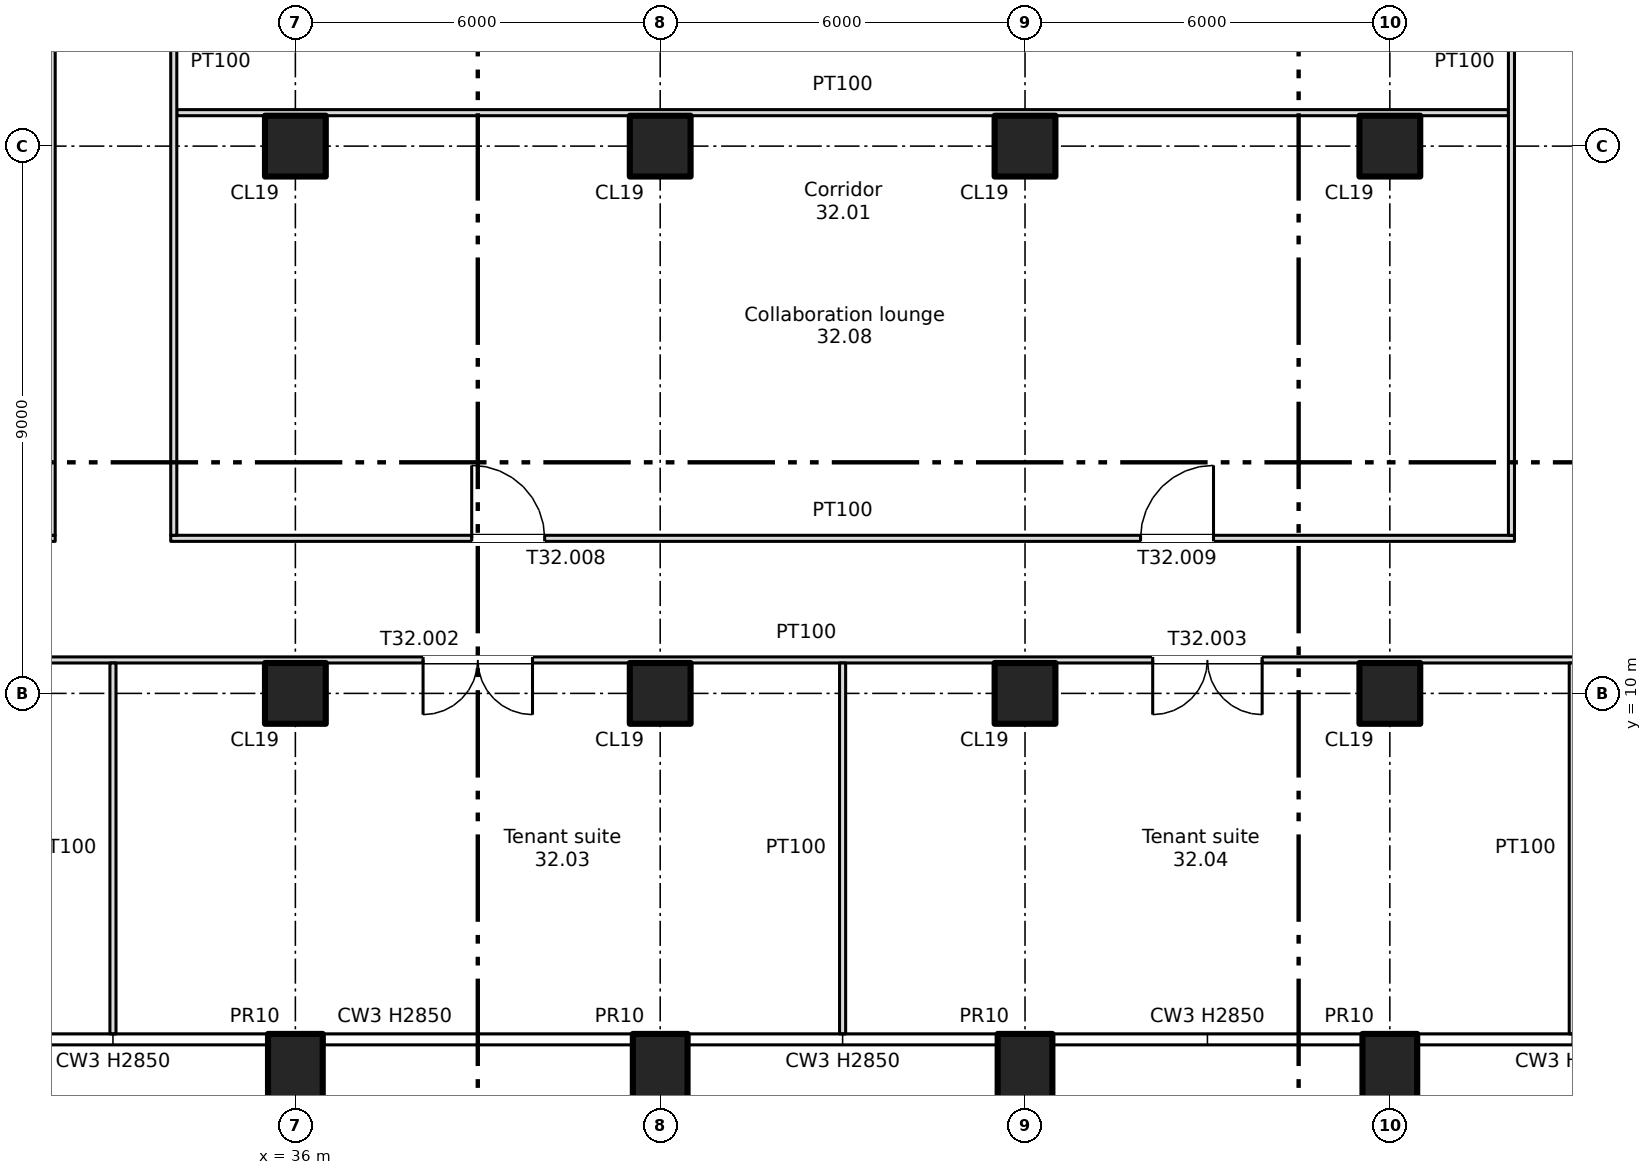
"""IFC4 building model, lengths in metres.
Left out: names, types, materials, properties, quantities, classifications, styles, units other than length and angle.
Written with IfcOpenShell. Run it as: python <this file> out.ifc"""

import sys

from ifc_helpers import new_model, si_unit, direction, frame, frame_2d, origin, origin_2d, place, context, subcontext, project, spatial, rectangle, extrude, element, fill, save


model = new_model("IFC4")
c1 = context("Model", 3, precision=1e-05, world=origin(), true_north=direction((0.0, 1.0)))
c2 = subcontext(c1, "Body", "Model", "MODEL_VIEW")
j1 = project(units=[si_unit("LENGTHUNIT", "METRE"), si_unit("PLANEANGLEUNIT", "RADIAN")], contexts=[c1])
p1 = place(None, origin())
s1 = spatial("IfcSite", under=j1, at=p1, CompositionType="ELEMENT")
p2 = place(p1, origin())
s2 = spatial("IfcBuilding", under=s1, at=p2, CompositionType="ELEMENT")
p3 = place(p2, frame((0.0, 0.0, 223.0)))
s3 = spatial("IfcBuildingStorey", under=s2, at=p3, CompositionType="ELEMENT", Elevation=223.0)
for number, where, z_axis, x_axis in (
    (1, (36.0, 3.7, -0.4), (0.0, 0.0, 1.0), (1.0, 0.0, 0.0)),
    (2, (42.0, 3.7, -0.4), (0.0, 0.0, 1.0), (1.0, 0.0, 0.0)),
    (3, (48.0, 3.7, -0.4), (0.0, 0.0, 1.0), (1.0, 0.0, 0.0)),
    (4, (54.0, 3.7, -0.4), (0.0, 0.0, 1.0), (1.0, 0.0, 0.0)),
):
    element("IfcColumn", number, at=place(p3, frame(where, z_axis=z_axis, x_axis=x_axis)), inside=s3, PredefinedType="COLUMN", context=c2, shape_type="SweptSolid", body=[
        extrude(rectangle(XDim=0.9, YDim=1.4, at=origin_2d()), origin(), (0.0, 0.0, 1.0), 3.55),
    ])
for number, where, z_axis, x_axis in (
    (5, (36.0, 10.0, 0.0), (0.0, 0.0, 1.0), (1.0, 0.0, 0.0)),
    (6, (36.0, 19.0, 0.0), (0.0, 0.0, 1.0), (1.0, 0.0, 0.0)),
    (7, (42.0, 10.0, 0.0), (0.0, 0.0, 1.0), (1.0, 0.0, 0.0)),
    (8, (42.0, 19.0, 0.0), (0.0, 0.0, 1.0), (1.0, 0.0, 0.0)),
    (9, (48.0, 10.0, 0.0), (0.0, 0.0, 1.0), (1.0, 0.0, 0.0)),
    (10, (48.0, 19.0, 0.0), (0.0, 0.0, 1.0), (1.0, 0.0, 0.0)),
    (11, (54.0, 10.0, 0.0), (0.0, 0.0, 1.0), (1.0, 0.0, 0.0)),
    (12, (54.0, 19.0, 0.0), (0.0, 0.0, 1.0), (1.0, 0.0, 0.0)),
):
    element("IfcColumn", number, at=place(p3, frame(where, z_axis=z_axis, x_axis=x_axis)), inside=s3, PredefinedType="COLUMN", context=c2, shape_type="SweptSolid", body=[
        extrude(rectangle(XDim=1.0, YDim=1.0, at=origin_2d()), origin(), (0.0, 0.0, 1.0), 3.15),
    ])
p4 = place(p3, frame((6.6, 10.55, 0.0), z_axis=(0.0, 0.0, 1.0), x_axis=(1.0, 0.0, 0.0)))
e13 = element("IfcWall", 13, at=p4, inside=s3, PredefinedType="PARTITIONING", context=c2, shape_type="SweptSolid", body=[
    extrude(rectangle(XDim=64.8, YDim=0.1, at=frame_2d((32.4, 0.0))), origin(), (0.0, 0.0, 1.0), 3.15),
])
p5 = place(p4, frame((19.5, 0.0, 0.0)))
e14 = element("IfcOpeningElement", 14, at=p5, cuts=e13, PredefinedType="OPENING", context=c2, shape_type="SweptSolid", body=[
    extrude(rectangle(XDim=1.8, YDim=2.1, at=frame_2d((0.9, 1.05))), frame((0.0, 0.06, 0.0), z_axis=(0.0, -1.0, 0.0), x_axis=(1.0, 0.0, 0.0)), (0.0, 0.0, 1.0), 0.12),
])
p6 = place(p4, frame((31.5, 0.0, 0.0)))
e15 = element("IfcOpeningElement", 15, at=p6, cuts=e13, PredefinedType="OPENING", context=c2, shape_type="SweptSolid", body=[
    extrude(rectangle(XDim=1.8, YDim=2.1, at=frame_2d((0.9, 1.05))), frame((0.0, 0.06, 0.0), z_axis=(0.0, -1.0, 0.0), x_axis=(1.0, 0.0, 0.0)), (0.0, 0.0, 1.0), 0.12),
])
p7 = place(p4, frame((43.5, 0.0, 0.0)))
e16 = element("IfcOpeningElement", 16, at=p7, cuts=e13, PredefinedType="OPENING", context=c2, shape_type="SweptSolid", body=[
    extrude(rectangle(XDim=1.8, YDim=2.1, at=frame_2d((0.9, 1.05))), frame((0.0, 0.06, 0.0), z_axis=(0.0, -1.0, 0.0), x_axis=(1.0, 0.0, 0.0)), (0.0, 0.0, 1.0), 0.12),
])
p8 = place(p4, frame((6.3, 0.0, 0.0)))
e17 = element("IfcOpeningElement", 17, at=p8, cuts=e13, PredefinedType="OPENING", context=c2, shape_type="SweptSolid", body=[
    extrude(rectangle(XDim=1.8, YDim=2.1, at=frame_2d((0.9, 1.05))), frame((0.0, 0.06, 0.0), z_axis=(0.0, -1.0, 0.0), x_axis=(1.0, 0.0, 0.0)), (0.0, 0.0, 1.0), 0.12),
])
p9 = place(p4, frame((56.7, 0.0, 0.0)))
e18 = element("IfcOpeningElement", 18, at=p9, cuts=e13, PredefinedType="OPENING", context=c2, shape_type="SweptSolid", body=[
    extrude(rectangle(XDim=1.8, YDim=2.1, at=frame_2d((0.9, 1.05))), frame((0.0, 0.06, 0.0), z_axis=(0.0, -1.0, 0.0), x_axis=(1.0, 0.0, 0.0)), (0.0, 0.0, 1.0), 0.12),
])
p10 = place(p3, frame((6.6, 12.55, 0.0), z_axis=(0.0, 0.0, 1.0), x_axis=(1.0, 0.0, 0.0)))
e19 = element("IfcWall", 19, at=p10, inside=s3, PredefinedType="PARTITIONING", context=c2, shape_type="SweptSolid", body=[
    extrude(rectangle(XDim=25.45, YDim=0.1, at=frame_2d((12.725, 0.0))), origin(), (0.0, 0.0, 1.0), 3.15),
])
p11 = place(p10, frame((5.75, 0.0, 0.0)))
e20 = element("IfcOpeningElement", 20, at=p11, cuts=e19, PredefinedType="OPENING", context=c2, shape_type="SweptSolid", body=[
    extrude(rectangle(XDim=1.2, YDim=2.1, at=frame_2d((0.6, 1.05))), frame((0.0, 0.06, 0.0), z_axis=(0.0, -1.0, 0.0), x_axis=(1.0, 0.0, 0.0)), (0.0, 0.0, 1.0), 0.12),
])
p12 = place(p10, frame((18.45, 0.0, 0.0)))
e21 = element("IfcOpeningElement", 21, at=p12, cuts=e19, PredefinedType="OPENING", context=c2, shape_type="SweptSolid", body=[
    extrude(rectangle(XDim=1.2, YDim=2.1, at=frame_2d((0.6, 1.05))), frame((0.0, 0.06, 0.0), z_axis=(0.0, -1.0, 0.0), x_axis=(1.0, 0.0, 0.0)), (0.0, 0.0, 1.0), 0.12),
])
p13 = place(p3, frame((33.95, 12.55, 0.0), z_axis=(0.0, 0.0, 1.0), x_axis=(1.0, 0.0, 0.0)))
e22 = element("IfcWall", 22, at=p13, inside=s3, PredefinedType="PARTITIONING", context=c2, shape_type="SweptSolid", body=[
    extrude(rectangle(XDim=22.1, YDim=0.1, at=frame_2d((11.05, 0.0))), origin(), (0.0, 0.0, 1.0), 3.15),
])
p14 = place(p13, frame((4.95, 0.0, 0.0)))
e23 = element("IfcOpeningElement", 23, at=p14, cuts=e22, PredefinedType="OPENING", context=c2, shape_type="SweptSolid", body=[
    extrude(rectangle(XDim=1.2, YDim=2.1, at=frame_2d((0.6, 1.05))), frame((0.0, 0.06, 0.0), z_axis=(0.0, -1.0, 0.0), x_axis=(1.0, 0.0, 0.0)), (0.0, 0.0, 1.0), 0.12),
])
p15 = place(p13, frame((15.95, 0.0, 0.0)))
e24 = element("IfcOpeningElement", 24, at=p15, cuts=e22, PredefinedType="OPENING", context=c2, shape_type="SweptSolid", body=[
    extrude(rectangle(XDim=1.2, YDim=2.1, at=frame_2d((0.6, 1.05))), frame((0.0, 0.06, 0.0), z_axis=(0.0, -1.0, 0.0), x_axis=(1.0, 0.0, 0.0)), (0.0, 0.0, 1.0), 0.12),
])
p16 = place(p3, frame((34.05, 19.55, 0.0), z_axis=(0.0, 0.0, 1.0), x_axis=(1.0, 0.0, 0.0)))
e25 = element("IfcWall", 25, at=p16, inside=s3, PredefinedType="PARTITIONING", context=c2, shape_type="SweptSolid", body=[
    extrude(rectangle(XDim=21.9, YDim=0.1, at=frame_2d((10.95, 0.0))), origin(), (0.0, 0.0, 1.0), 3.15),
])
p17 = place(p3, frame((32.0, 12.6, 0.0), z_axis=(0.0, 0.0, 1.0), x_axis=(0.0, 1.0, 0.0)))
e26 = element("IfcWall", 26, at=p17, inside=s3, PredefinedType="PARTITIONING", context=c2, shape_type="SweptSolid", body=[
    extrude(rectangle(XDim=13.35, YDim=0.1, at=frame_2d((6.675, 0.0))), origin(), (0.0, 0.0, 1.0), 3.15),
])
p18 = place(p3, frame((33.0, 4.4, 0.0), z_axis=(0.0, 0.0, 1.0), x_axis=(0.0, 1.0, 0.0)))
e27 = element("IfcWall", 27, at=p18, inside=s3, PredefinedType="PARTITIONING", context=c2, shape_type="SweptSolid", body=[
    extrude(rectangle(XDim=6.1, YDim=0.1, at=frame_2d((3.05, 0.0))), origin(), (0.0, 0.0, 1.0), 3.15),
])
p19 = place(p3, frame((34.0, 12.6, 0.0), z_axis=(0.0, 0.0, 1.0), x_axis=(0.0, 1.0, 0.0)))
e28 = element("IfcWall", 28, at=p19, inside=s3, PredefinedType="PARTITIONING", context=c2, shape_type="SweptSolid", body=[
    extrude(rectangle(XDim=13.35, YDim=0.1, at=frame_2d((6.675, 0.0))), origin(), (0.0, 0.0, 1.0), 3.15),
])
p20 = place(p3, frame((45.0, 4.4, 0.0), z_axis=(0.0, 0.0, 1.0), x_axis=(0.0, 1.0, 0.0)))
e29 = element("IfcWall", 29, at=p20, inside=s3, PredefinedType="PARTITIONING", context=c2, shape_type="SweptSolid", body=[
    extrude(rectangle(XDim=6.1, YDim=0.1, at=frame_2d((3.05, 0.0))), origin(), (0.0, 0.0, 1.0), 3.15),
])
p21 = place(p3, frame((56.0, 12.6, 0.0), z_axis=(0.0, 0.0, 1.0), x_axis=(0.0, 1.0, 0.0)))
e30 = element("IfcWall", 30, at=p21, inside=s3, PredefinedType="PARTITIONING", context=c2, shape_type="SweptSolid", body=[
    extrude(rectangle(XDim=13.35, YDim=0.1, at=frame_2d((6.675, 0.0))), origin(), (0.0, 0.0, 1.0), 3.15),
])
p22 = place(p3, frame((57.0, 4.4, 0.0), z_axis=(0.0, 0.0, 1.0), x_axis=(0.0, 1.0, 0.0)))
e31 = element("IfcWall", 31, at=p22, inside=s3, PredefinedType="PARTITIONING", context=c2, shape_type="SweptSolid", body=[
    extrude(rectangle(XDim=6.1, YDim=0.1, at=frame_2d((3.05, 0.0))), origin(), (0.0, 0.0, 1.0), 3.15),
])
p23 = place(p6, origin())
e32 = element("IfcDoor", 32, at=p23, inside=s3, OperationType="DOUBLE_DOOR_SINGLE_SWING", PredefinedType="DOOR", context=c2, shape_type="SweptSolid", body=[
    extrude(rectangle(XDim=1.8, YDim=2.1, at=frame_2d((0.9, 1.05))), frame((0.0, 0.025, 0.0), z_axis=(0.0, -1.0, 0.0), x_axis=(1.0, 0.0, 0.0)), (0.0, 0.0, 1.0), 0.05),
])
fill(e15, e32)
p24 = place(p7, origin())
e33 = element("IfcDoor", 33, at=p24, inside=s3, OperationType="DOUBLE_DOOR_SINGLE_SWING", PredefinedType="DOOR", context=c2, shape_type="SweptSolid", body=[
    extrude(rectangle(XDim=1.8, YDim=2.1, at=frame_2d((0.9, 1.05))), frame((0.0, 0.025, 0.0), z_axis=(0.0, -1.0, 0.0), x_axis=(1.0, 0.0, 0.0)), (0.0, 0.0, 1.0), 0.05),
])
fill(e16, e33)
p25 = place(p14, origin())
e34 = element("IfcDoor", 34, at=p25, inside=s3, OperationType="SINGLE_SWING_LEFT", PredefinedType="DOOR", context=c2, shape_type="SweptSolid", body=[
    extrude(rectangle(XDim=1.2, YDim=2.1, at=frame_2d((0.6, 1.05))), frame((0.0, 0.025, 0.0), z_axis=(0.0, -1.0, 0.0), x_axis=(1.0, 0.0, 0.0)), (0.0, 0.0, 1.0), 0.05),
])
fill(e23, e34)
p26 = place(p15, origin())
e35 = element("IfcDoor", 35, at=p26, inside=s3, OperationType="SINGLE_SWING_RIGHT", PredefinedType="DOOR", context=c2, shape_type="SweptSolid", body=[
    extrude(rectangle(XDim=1.2, YDim=2.1, at=frame_2d((0.6, 1.05))), frame((0.0, 0.025, 0.0), z_axis=(0.0, -1.0, 0.0), x_axis=(1.0, 0.0, 0.0)), (0.0, 0.0, 1.0), 0.05),
])
fill(e24, e35)
save(model, sys.argv[1])
